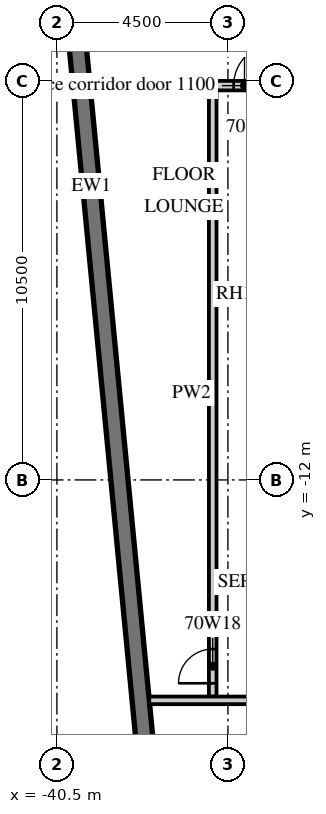
"""IFC4 building model, lengths in metres.
Left out: names, types, materials, properties, quantities, classifications, styles, units other than length and angle.
Written with IfcOpenShell. Run it as: python <this file> out.ifc"""

import sys

from ifc_helpers import new_model, si_unit, direction, frame, frame_2d, origin, place, context, subcontext, project, spatial, rectangle, extrude, element, fill, save


model = new_model("IFC4")
c1 = context("Model", 3, precision=1e-05, world=origin(), true_north=direction((0.0, 1.0)))
c2 = subcontext(c1, "Body", "Model", "MODEL_VIEW")
j1 = project(units=[si_unit("LENGTHUNIT", "METRE"), si_unit("PLANEANGLEUNIT", "RADIAN")], contexts=[c1])
p1 = place(None, origin())
s1 = spatial("IfcSite", under=j1, at=p1, CompositionType="ELEMENT")
p2 = place(p1, origin())
s2 = spatial("IfcBuilding", under=s1, at=p2, CompositionType="ELEMENT")
p3 = place(p2, frame((0.0, 0.0, 281.7)))
s3 = spatial("IfcBuildingStorey", under=s2, at=p3, CompositionType="ELEMENT", Elevation=281.7)
p4 = place(p3, frame((-41.132, 11.658, 0.0), z_axis=(0.0, 0.0, 1.0), x_axis=(0.095847749461, -0.995396006082, 0.0)))
e1 = element("IfcWall", 1, at=p4, inside=s3, PredefinedType="SOLIDWALL", context=c2, shape_type="SweptSolid", body=[
    extrude(rectangle(XDim=32.0, YDim=0.45, at=frame_2d((16.0, 0.0))), origin(), (0.0, 0.0, 1.0), 3.02),
])
p5 = place(p4, frame((2.053, 0.0, 0.45)))
e2 = element("IfcOpeningElement", 2, at=p5, cuts=e1, PredefinedType="OPENING", context=c2, shape_type="SweptSolid", body=[
    extrude(rectangle(XDim=3.3, YDim=2.25, at=frame_2d((1.65, 1.125))), frame((0.0, 0.235, 0.0), z_axis=(0.0, -1.0, 0.0), x_axis=(1.0, 0.0, 0.0)), (0.0, 0.0, 1.0), 0.47),
])
p6 = place(p4, frame((6.574, 0.0, 0.45)))
e3 = element("IfcOpeningElement", 3, at=p6, cuts=e1, PredefinedType="OPENING", context=c2, shape_type="SweptSolid", body=[
    extrude(rectangle(XDim=3.3, YDim=2.25, at=frame_2d((1.65, 1.125))), frame((0.0, 0.235, 0.0), z_axis=(0.0, -1.0, 0.0), x_axis=(1.0, 0.0, 0.0)), (0.0, 0.0, 1.0), 0.47),
])
p7 = place(p3, frame((-39.627, -1.625, 0.0), z_axis=(0.0, 0.0, 1.0), x_axis=(1.0, 0.0, 0.0)))
e4 = element("IfcWall", 4, at=p7, inside=s3, PredefinedType="PARTITIONING", context=c2, shape_type="SweptSolid", body=[
    extrude(rectangle(XDim=8.127, YDim=0.25, at=frame_2d((4.063, 0.0))), origin(), (0.0, 0.0, 1.0), 3.02),
])
p8 = place(p7, frame((6.202, 0.0, 0.0)))
e5 = element("IfcOpeningElement", 5, at=p8, cuts=e4, PredefinedType="OPENING", context=c2, shape_type="SweptSolid", body=[
    extrude(rectangle(XDim=1.3, YDim=2.1, at=frame_2d((0.65, 1.05))), frame((0.0, 0.135, 0.0), z_axis=(0.0, -1.0, 0.0), x_axis=(1.0, 0.0, 0.0)), (0.0, 0.0, 1.0), 0.27),
])
p9 = place(p7, frame((3.777, 0.0, 0.0)))
e6 = element("IfcOpeningElement", 6, at=p9, cuts=e4, PredefinedType="OPENING", context=c2, shape_type="SweptSolid", body=[
    extrude(rectangle(XDim=1.1, YDim=2.1, at=frame_2d((0.55, 1.05))), frame((0.0, 0.135, 0.0), z_axis=(0.0, -1.0, 0.0), x_axis=(1.0, 0.0, 0.0)), (0.0, 0.0, 1.0), 0.27),
])
p10 = place(p3, frame((-36.4, -17.7, 0.0), z_axis=(0.0, 0.0, 1.0), x_axis=(0.0, 1.0, 0.0)))
e7 = element("IfcWall", 7, at=p10, inside=s3, PredefinedType="PARTITIONING", context=c2, shape_type="SweptSolid", body=[
    extrude(rectangle(XDim=15.95, YDim=0.2, at=frame_2d((7.975, 0.0))), origin(), (0.0, 0.0, 1.0), 3.02),
])
p11 = place(p10, frame((0.35, 0.0, 0.0)))
e8 = element("IfcOpeningElement", 8, at=p11, cuts=e7, PredefinedType="OPENING", context=c2, shape_type="SweptSolid", body=[
    extrude(rectangle(XDim=0.9, YDim=2.1, at=frame_2d((0.45, 1.05))), frame((0.0, 0.11, 0.0), z_axis=(0.0, -1.0, 0.0), x_axis=(1.0, 0.0, 0.0)), (0.0, 0.0, 1.0), 0.22),
])
p12 = place(p3, frame((-38.07, -17.8, 0.0), z_axis=(0.0, 0.0, 1.0), x_axis=(1.0, 0.0, 0.0)))
e9 = element("IfcWall", 9, at=p12, inside=s3, PredefinedType="PARTITIONING", context=c2, shape_type="SweptSolid", body=[
    extrude(rectangle(XDim=24.47, YDim=0.2, at=frame_2d((12.235, 0.0))), origin(), (0.0, 0.0, 1.0), 3.02),
])
p13 = place(p12, frame((8.557, 0.0, 0.0)))
e10 = element("IfcOpeningElement", 10, at=p13, cuts=e9, PredefinedType="OPENING", context=c2, shape_type="SweptSolid", body=[
    extrude(rectangle(XDim=0.9, YDim=2.1, at=frame_2d((0.45, 1.05))), frame((0.0, 0.11, 0.0), z_axis=(0.0, -1.0, 0.0), x_axis=(1.0, 0.0, 0.0)), (0.0, 0.0, 1.0), 0.22),
])
p14 = place(p12, frame((16.857, 0.0, 0.0)))
e11 = element("IfcOpeningElement", 11, at=p14, cuts=e9, PredefinedType="OPENING", context=c2, shape_type="SweptSolid", body=[
    extrude(rectangle(XDim=0.9, YDim=2.1, at=frame_2d((0.45, 1.05))), frame((0.0, 0.11, 0.0), z_axis=(0.0, -1.0, 0.0), x_axis=(1.0, 0.0, 0.0)), (0.0, 0.0, 1.0), 0.22),
])
p15 = place(p9, origin())
e12 = element("IfcDoor", 12, at=p15, inside=s3, OperationType="SINGLE_SWING_RIGHT", PredefinedType="DOOR", context=c2, shape_type="SweptSolid", body=[
    extrude(rectangle(XDim=1.1, YDim=2.1, at=frame_2d((0.55, 1.05))), frame((0.0, 0.025, 0.0), z_axis=(0.0, -1.0, 0.0), x_axis=(1.0, 0.0, 0.0)), (0.0, 0.0, 1.0), 0.05),
])
fill(e6, e12)
p16 = place(p11, origin())
e13 = element("IfcDoor", 13, at=p16, inside=s3, OperationType="SINGLE_SWING_LEFT", PredefinedType="DOOR", context=c2, shape_type="SweptSolid", body=[
    extrude(rectangle(XDim=0.9, YDim=2.1, at=frame_2d((0.45, 1.05))), frame((0.0, 0.025, 0.0), z_axis=(0.0, -1.0, 0.0), x_axis=(1.0, 0.0, 0.0)), (0.0, 0.0, 1.0), 0.05),
])
fill(e8, e13)
save(model, sys.argv[1])
